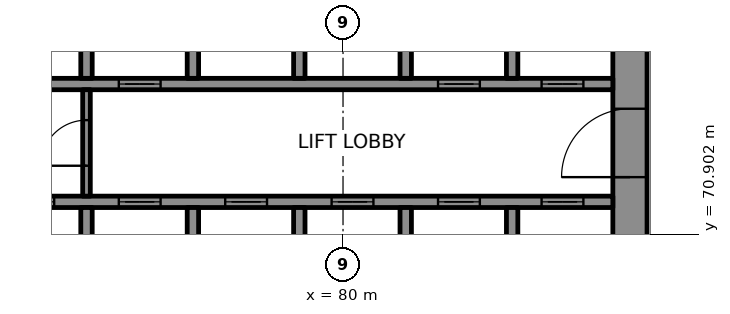
"""IFC4 building model, lengths in metres.
Left out: names, types, materials, properties, quantities, classifications, styles, units other than length and angle.
Written with IfcOpenShell. Run it as: python <this file> out.ifc"""

import sys

from ifc_helpers import new_model, si_unit, direction, frame, frame_2d, origin, place, context, subcontext, project, spatial, rectangle, extrude, element, fill, save


model = new_model("IFC4")
c1 = context("Model", 3, precision=1e-05, world=origin(), true_north=direction((0.0, 1.0)))
c2 = subcontext(c1, "Body", "Model", "MODEL_VIEW")
j1 = project(units=[si_unit("LENGTHUNIT", "METRE"), si_unit("PLANEANGLEUNIT", "RADIAN")], contexts=[c1])
p1 = place(None, origin())
s1 = spatial("IfcSite", under=j1, at=p1, CompositionType="ELEMENT")
p2 = place(p1, origin())
s2 = spatial("IfcBuilding", under=s1, at=p2, CompositionType="ELEMENT")
p3 = place(p2, frame((0.0, 0.0, 12.6)))
s3 = spatial("IfcBuildingStorey", under=s2, at=p3, CompositionType="ELEMENT", Elevation=12.6)
p4 = place(p3, frame((87.55, 66.9, 0.0), z_axis=(0.0, 0.0, 1.0), x_axis=(0.0, 1.0, 0.0)))
e1 = element("IfcWall", 1, at=p4, inside=s3, PredefinedType="SHEAR", context=c2, shape_type="SweptSolid", body=[
    extrude(rectangle(XDim=16.2, YDim=0.9, at=frame_2d((8.1, 0.0))), origin(), (0.0, 0.0, 1.0), 4.3),
])
p5 = place(p4, frame((5.5, 0.0, 0.0)))
e2 = element("IfcOpeningElement", 2, at=p5, cuts=e1, PredefinedType="OPENING", context=c2, shape_type="SweptSolid", body=[
    extrude(rectangle(XDim=1.8, YDim=2.1, at=frame_2d((0.9, 1.05))), frame((0.0, 0.46, 0.0), z_axis=(0.0, -1.0, 0.0), x_axis=(1.0, 0.0, 0.0)), (0.0, 0.0, 1.0), 0.92),
])
p6 = place(p4, frame((11.738, 0.0, 0.0)))
e3 = element("IfcOpeningElement", 3, at=p6, cuts=e1, PredefinedType="OPENING", context=c2, shape_type="SweptSolid", body=[
    extrude(rectangle(XDim=0.9, YDim=2.1, at=frame_2d((0.45, 1.05))), frame((0.0, 0.46, 0.0), z_axis=(0.0, -1.0, 0.0), x_axis=(1.0, 0.0, 0.0)), (0.0, 0.0, 1.0), 0.92),
])
p7 = place(p3, frame((70.3, 71.75, 0.0), z_axis=(0.0, 0.0, 1.0), x_axis=(1.0, 0.0, 0.0)))
e4 = element("IfcWall", 4, at=p7, inside=s3, PredefinedType="SHEAR", context=c2, shape_type="SweptSolid", body=[
    extrude(rectangle(XDim=16.8, YDim=0.3, at=frame_2d((8.4, 0.0))), origin(), (0.0, 0.0, 1.0), 4.3),
])
p8 = place(p7, frame((1.0, 0.0, 0.0)))
e5 = element("IfcOpeningElement", 5, at=p8, cuts=e4, PredefinedType="OPENING", context=c2, shape_type="SweptSolid", body=[
    extrude(rectangle(XDim=1.1, YDim=2.1, at=frame_2d((0.55, 1.05))), frame((0.0, 0.16, 0.0), z_axis=(0.0, -1.0, 0.0), x_axis=(1.0, 0.0, 0.0)), (0.0, 0.0, 1.0), 0.32),
])
p9 = place(p7, frame((3.8, 0.0, 0.0)))
e6 = element("IfcOpeningElement", 6, at=p9, cuts=e4, PredefinedType="OPENING", context=c2, shape_type="SweptSolid", body=[
    extrude(rectangle(XDim=1.1, YDim=2.1, at=frame_2d((0.55, 1.05))), frame((0.0, 0.16, 0.0), z_axis=(0.0, -1.0, 0.0), x_axis=(1.0, 0.0, 0.0)), (0.0, 0.0, 1.0), 0.32),
])
p10 = place(p7, frame((6.6, 0.0, 0.0)))
e7 = element("IfcOpeningElement", 7, at=p10, cuts=e4, PredefinedType="OPENING", context=c2, shape_type="SweptSolid", body=[
    extrude(rectangle(XDim=1.1, YDim=2.1, at=frame_2d((0.55, 1.05))), frame((0.0, 0.16, 0.0), z_axis=(0.0, -1.0, 0.0), x_axis=(1.0, 0.0, 0.0)), (0.0, 0.0, 1.0), 0.32),
])
p11 = place(p7, frame((9.4, 0.0, 0.0)))
e8 = element("IfcOpeningElement", 8, at=p11, cuts=e4, PredefinedType="OPENING", context=c2, shape_type="SweptSolid", body=[
    extrude(rectangle(XDim=1.1, YDim=2.1, at=frame_2d((0.55, 1.05))), frame((0.0, 0.16, 0.0), z_axis=(0.0, -1.0, 0.0), x_axis=(1.0, 0.0, 0.0)), (0.0, 0.0, 1.0), 0.32),
])
p12 = place(p7, frame((12.2, 0.0, 0.0)))
e9 = element("IfcOpeningElement", 9, at=p12, cuts=e4, PredefinedType="OPENING", context=c2, shape_type="SweptSolid", body=[
    extrude(rectangle(XDim=1.1, YDim=2.1, at=frame_2d((0.55, 1.05))), frame((0.0, 0.16, 0.0), z_axis=(0.0, -1.0, 0.0), x_axis=(1.0, 0.0, 0.0)), (0.0, 0.0, 1.0), 0.32),
])
p13 = place(p7, frame((14.925, 0.0, 0.0)))
e10 = element("IfcOpeningElement", 10, at=p13, cuts=e4, PredefinedType="OPENING", context=c2, shape_type="SweptSolid", body=[
    extrude(rectangle(XDim=1.1, YDim=2.1, at=frame_2d((0.55, 1.05))), frame((0.0, 0.16, 0.0), z_axis=(0.0, -1.0, 0.0), x_axis=(1.0, 0.0, 0.0)), (0.0, 0.0, 1.0), 0.32),
])
p14 = place(p3, frame((70.3, 74.85, 0.0), z_axis=(0.0, 0.0, 1.0), x_axis=(1.0, 0.0, 0.0)))
e11 = element("IfcWall", 11, at=p14, inside=s3, PredefinedType="SHEAR", context=c2, shape_type="SweptSolid", body=[
    extrude(rectangle(XDim=16.8, YDim=0.3, at=frame_2d((8.4, 0.0))), origin(), (0.0, 0.0, 1.0), 4.3),
])
p15 = place(p14, frame((3.8, 0.0, 0.0)))
e12 = element("IfcOpeningElement", 12, at=p15, cuts=e11, PredefinedType="OPENING", context=c2, shape_type="SweptSolid", body=[
    extrude(rectangle(XDim=1.1, YDim=2.1, at=frame_2d((0.55, 1.05))), frame((0.0, 0.16, 0.0), z_axis=(0.0, -1.0, 0.0), x_axis=(1.0, 0.0, 0.0)), (0.0, 0.0, 1.0), 0.32),
])
p16 = place(p14, frame((12.2, 0.0, 0.0)))
e13 = element("IfcOpeningElement", 13, at=p16, cuts=e11, PredefinedType="OPENING", context=c2, shape_type="SweptSolid", body=[
    extrude(rectangle(XDim=1.1, YDim=2.1, at=frame_2d((0.55, 1.05))), frame((0.0, 0.16, 0.0), z_axis=(0.0, -1.0, 0.0), x_axis=(1.0, 0.0, 0.0)), (0.0, 0.0, 1.0), 0.32),
])
p17 = place(p14, frame((14.925, 0.0, 0.0)))
e14 = element("IfcOpeningElement", 14, at=p17, cuts=e11, PredefinedType="OPENING", context=c2, shape_type="SweptSolid", body=[
    extrude(rectangle(XDim=1.1, YDim=2.1, at=frame_2d((0.55, 1.05))), frame((0.0, 0.16, 0.0), z_axis=(0.0, -1.0, 0.0), x_axis=(1.0, 0.0, 0.0)), (0.0, 0.0, 1.0), 0.32),
])
for number, where, z_axis, x_axis in (
    (15, (73.25, 69.0, 0.0), (0.0, 0.0, 1.0), (0.0, 1.0, 0.0)),
    (16, (73.25, 75.0, 0.0), (0.0, 0.0, 1.0), (0.0, 1.0, 0.0)),
    (17, (76.05, 69.0, 0.0), (0.0, 0.0, 1.0), (0.0, 1.0, 0.0)),
    (18, (76.05, 75.0, 0.0), (0.0, 0.0, 1.0), (0.0, 1.0, 0.0)),
    (19, (78.85, 69.0, 0.0), (0.0, 0.0, 1.0), (0.0, 1.0, 0.0)),
    (20, (78.85, 75.0, 0.0), (0.0, 0.0, 1.0), (0.0, 1.0, 0.0)),
    (21, (81.65, 69.0, 0.0), (0.0, 0.0, 1.0), (0.0, 1.0, 0.0)),
    (22, (81.65, 75.0, 0.0), (0.0, 0.0, 1.0), (0.0, 1.0, 0.0)),
    (23, (84.45, 69.0, 0.0), (0.0, 0.0, 1.0), (0.0, 1.0, 0.0)),
    (24, (84.45, 75.0, 0.0), (0.0, 0.0, 1.0), (0.0, 1.0, 0.0)),
):
    element("IfcWall", number, at=place(p3, frame(where, z_axis=z_axis, x_axis=x_axis)), inside=s3, PredefinedType="SHEAR", context=c2, shape_type="SweptSolid", body=[
        extrude(rectangle(XDim=2.6, YDim=0.3, at=frame_2d((1.3, 0.0))), origin(), (0.0, 0.0, 1.0), 4.3),
    ])
p18 = place(p3, frame((73.25, 71.9, 0.0), z_axis=(0.0, 0.0, 1.0), x_axis=(0.0, 1.0, 0.0)))
e25 = element("IfcWall", 25, at=p18, inside=s3, PredefinedType="PARTITIONING", context=c2, shape_type="SweptSolid", body=[
    extrude(rectangle(XDim=2.8, YDim=0.2, at=frame_2d((1.4, 0.0))), origin(), (0.0, 0.0, 1.0), 4.3),
])
p19 = place(p18, frame((0.8, 0.0, 0.0)))
e26 = element("IfcOpeningElement", 26, at=p19, cuts=e25, PredefinedType="OPENING", context=c2, shape_type="SweptSolid", body=[
    extrude(rectangle(XDim=1.2, YDim=2.1, at=frame_2d((0.6, 1.05))), frame((0.0, 0.11, 0.0), z_axis=(0.0, -1.0, 0.0), x_axis=(1.0, 0.0, 0.0)), (0.0, 0.0, 1.0), 0.22),
])
p20 = place(p3, frame((107.106, 62.36, 0.0), z_axis=(0.0, 0.0, 1.0), x_axis=(-0.49999992739, 0.866025445706, 0.0)))
e27 = element("IfcWall", 27, at=p20, inside=s3, PredefinedType="SOLIDWALL", context=c2, shape_type="SweptSolid", body=[
    extrude(rectangle(XDim=54.0, YDim=0.4, at=frame_2d((27.0, 0.0))), origin(), (0.0, 0.0, 1.0), 4.24),
])
p21 = place(p3, frame((112.496, 65.725, 0.0), z_axis=(0.0, 0.0, 1.0), x_axis=(-0.499998673217, 0.866026169802, 0.0)))
e28 = element("IfcWall", 28, at=p21, inside=s3, PredefinedType="PARTITIONING", context=c2, shape_type="SweptSolid", body=[
    extrude(rectangle(XDim=53.48, YDim=0.2, at=frame_2d((26.74, 0.0))), origin(), (0.0, 0.0, 1.0), 4.24),
])
p22 = place(p21, frame((13.08, 0.0, 0.0)))
e29 = element("IfcOpeningElement", 29, at=p22, cuts=e28, PredefinedType="OPENING", context=c2, shape_type="SweptSolid", body=[
    extrude(rectangle(XDim=1.0, YDim=2.1, at=frame_2d((0.5, 1.05))), frame((0.0, 0.11, 0.0), z_axis=(0.0, -1.0, 0.0), x_axis=(1.0, 0.0, 0.0)), (0.0, 0.0, 1.0), 0.22),
])
p23 = place(p21, frame((26.28, 0.0, 0.0)))
e30 = element("IfcOpeningElement", 30, at=p23, cuts=e28, PredefinedType="OPENING", context=c2, shape_type="SweptSolid", body=[
    extrude(rectangle(XDim=1.0, YDim=2.1, at=frame_2d((0.5, 1.05))), frame((0.0, 0.11, 0.0), z_axis=(0.0, -1.0, 0.0), x_axis=(1.0, 0.0, 0.0)), (0.0, 0.0, 1.0), 0.22),
])
p24 = place(p21, frame((43.88, 0.0, 0.0)))
e31 = element("IfcOpeningElement", 31, at=p24, cuts=e28, PredefinedType="OPENING", context=c2, shape_type="SweptSolid", body=[
    extrude(rectangle(XDim=1.0, YDim=2.1, at=frame_2d((0.5, 1.05))), frame((0.0, 0.11, 0.0), z_axis=(0.0, -1.0, 0.0), x_axis=(1.0, 0.0, 0.0)), (0.0, 0.0, 1.0), 0.22),
])
p25 = place(p21, frame((50.58, 0.0, 0.0)))
e32 = element("IfcOpeningElement", 32, at=p25, cuts=e28, PredefinedType="OPENING", context=c2, shape_type="SweptSolid", body=[
    extrude(rectangle(XDim=1.0, YDim=2.1, at=frame_2d((0.5, 1.05))), frame((0.0, 0.11, 0.0), z_axis=(0.0, -1.0, 0.0), x_axis=(1.0, 0.0, 0.0)), (0.0, 0.0, 1.0), 0.22),
])
p26 = place(p8, origin())
e33 = element("IfcDoor", 33, at=p26, inside=s3, OperationType="DOUBLE_DOOR_SLIDING", PredefinedType="DOOR", context=c2, shape_type="SweptSolid", body=[
    extrude(rectangle(XDim=1.1, YDim=2.1, at=frame_2d((0.55, 1.05))), frame((0.0, 0.025, 0.0), z_axis=(0.0, -1.0, 0.0), x_axis=(1.0, 0.0, 0.0)), (0.0, 0.0, 1.0), 0.05),
])
fill(e5, e33)
p27 = place(p9, origin())
e34 = element("IfcDoor", 34, at=p27, inside=s3, OperationType="DOUBLE_DOOR_SLIDING", PredefinedType="DOOR", context=c2, shape_type="SweptSolid", body=[
    extrude(rectangle(XDim=1.1, YDim=2.1, at=frame_2d((0.55, 1.05))), frame((0.0, 0.025, 0.0), z_axis=(0.0, -1.0, 0.0), x_axis=(1.0, 0.0, 0.0)), (0.0, 0.0, 1.0), 0.05),
])
fill(e6, e34)
p28 = place(p10, origin())
e35 = element("IfcDoor", 35, at=p28, inside=s3, OperationType="DOUBLE_DOOR_SLIDING", PredefinedType="DOOR", context=c2, shape_type="SweptSolid", body=[
    extrude(rectangle(XDim=1.1, YDim=2.1, at=frame_2d((0.55, 1.05))), frame((0.0, 0.025, 0.0), z_axis=(0.0, -1.0, 0.0), x_axis=(1.0, 0.0, 0.0)), (0.0, 0.0, 1.0), 0.05),
])
fill(e7, e35)
p29 = place(p11, origin())
e36 = element("IfcDoor", 36, at=p29, inside=s3, OperationType="DOUBLE_DOOR_SLIDING", PredefinedType="DOOR", context=c2, shape_type="SweptSolid", body=[
    extrude(rectangle(XDim=1.1, YDim=2.1, at=frame_2d((0.55, 1.05))), frame((0.0, 0.025, 0.0), z_axis=(0.0, -1.0, 0.0), x_axis=(1.0, 0.0, 0.0)), (0.0, 0.0, 1.0), 0.05),
])
fill(e8, e36)
p30 = place(p12, origin())
e37 = element("IfcDoor", 37, at=p30, inside=s3, OperationType="DOUBLE_DOOR_SLIDING", PredefinedType="DOOR", context=c2, shape_type="SweptSolid", body=[
    extrude(rectangle(XDim=1.1, YDim=2.1, at=frame_2d((0.55, 1.05))), frame((0.0, 0.025, 0.0), z_axis=(0.0, -1.0, 0.0), x_axis=(1.0, 0.0, 0.0)), (0.0, 0.0, 1.0), 0.05),
])
fill(e9, e37)
p31 = place(p13, origin())
e38 = element("IfcDoor", 38, at=p31, inside=s3, OperationType="DOUBLE_DOOR_SLIDING", PredefinedType="DOOR", context=c2, shape_type="SweptSolid", body=[
    extrude(rectangle(XDim=1.1, YDim=2.1, at=frame_2d((0.55, 1.05))), frame((0.0, 0.025, 0.0), z_axis=(0.0, -1.0, 0.0), x_axis=(1.0, 0.0, 0.0)), (0.0, 0.0, 1.0), 0.05),
])
fill(e10, e38)
p32 = place(p15, origin())
e39 = element("IfcDoor", 39, at=p32, inside=s3, OperationType="DOUBLE_DOOR_SLIDING", PredefinedType="DOOR", context=c2, shape_type="SweptSolid", body=[
    extrude(rectangle(XDim=1.1, YDim=2.1, at=frame_2d((0.55, 1.05))), frame((0.0, 0.025, 0.0), z_axis=(0.0, -1.0, 0.0), x_axis=(1.0, 0.0, 0.0)), (0.0, 0.0, 1.0), 0.05),
])
fill(e12, e39)
p33 = place(p16, origin())
e40 = element("IfcDoor", 40, at=p33, inside=s3, OperationType="DOUBLE_DOOR_SLIDING", PredefinedType="DOOR", context=c2, shape_type="SweptSolid", body=[
    extrude(rectangle(XDim=1.1, YDim=2.1, at=frame_2d((0.55, 1.05))), frame((0.0, 0.025, 0.0), z_axis=(0.0, -1.0, 0.0), x_axis=(1.0, 0.0, 0.0)), (0.0, 0.0, 1.0), 0.05),
])
fill(e13, e40)
p34 = place(p17, origin())
e41 = element("IfcDoor", 41, at=p34, inside=s3, OperationType="DOUBLE_DOOR_SLIDING", PredefinedType="DOOR", context=c2, shape_type="SweptSolid", body=[
    extrude(rectangle(XDim=1.1, YDim=2.1, at=frame_2d((0.55, 1.05))), frame((0.0, 0.025, 0.0), z_axis=(0.0, -1.0, 0.0), x_axis=(1.0, 0.0, 0.0)), (0.0, 0.0, 1.0), 0.05),
])
fill(e14, e41)
p35 = place(p19, origin())
e42 = element("IfcDoor", 42, at=p35, inside=s3, OperationType="SINGLE_SWING_LEFT", PredefinedType="DOOR", context=c2, shape_type="SweptSolid", body=[
    extrude(rectangle(XDim=1.2, YDim=2.1, at=frame_2d((0.6, 1.05))), frame((0.0, 0.025, 0.0), z_axis=(0.0, -1.0, 0.0), x_axis=(1.0, 0.0, 0.0)), (0.0, 0.0, 1.0), 0.05),
])
fill(e26, e42)
p36 = place(p5, origin())
e43 = element("IfcDoor", 43, at=p36, inside=s3, OperationType="SINGLE_SWING_RIGHT", PredefinedType="DOOR", context=c2, shape_type="SweptSolid", body=[
    extrude(rectangle(XDim=1.8, YDim=2.1, at=frame_2d((0.9, 1.05))), frame((0.0, 0.17, 0.0), z_axis=(0.0, -1.0, 0.0), x_axis=(1.0, 0.0, 0.0)), (0.0, 0.0, 1.0), 0.34),
])
fill(e2, e43)
save(model, sys.argv[1])
